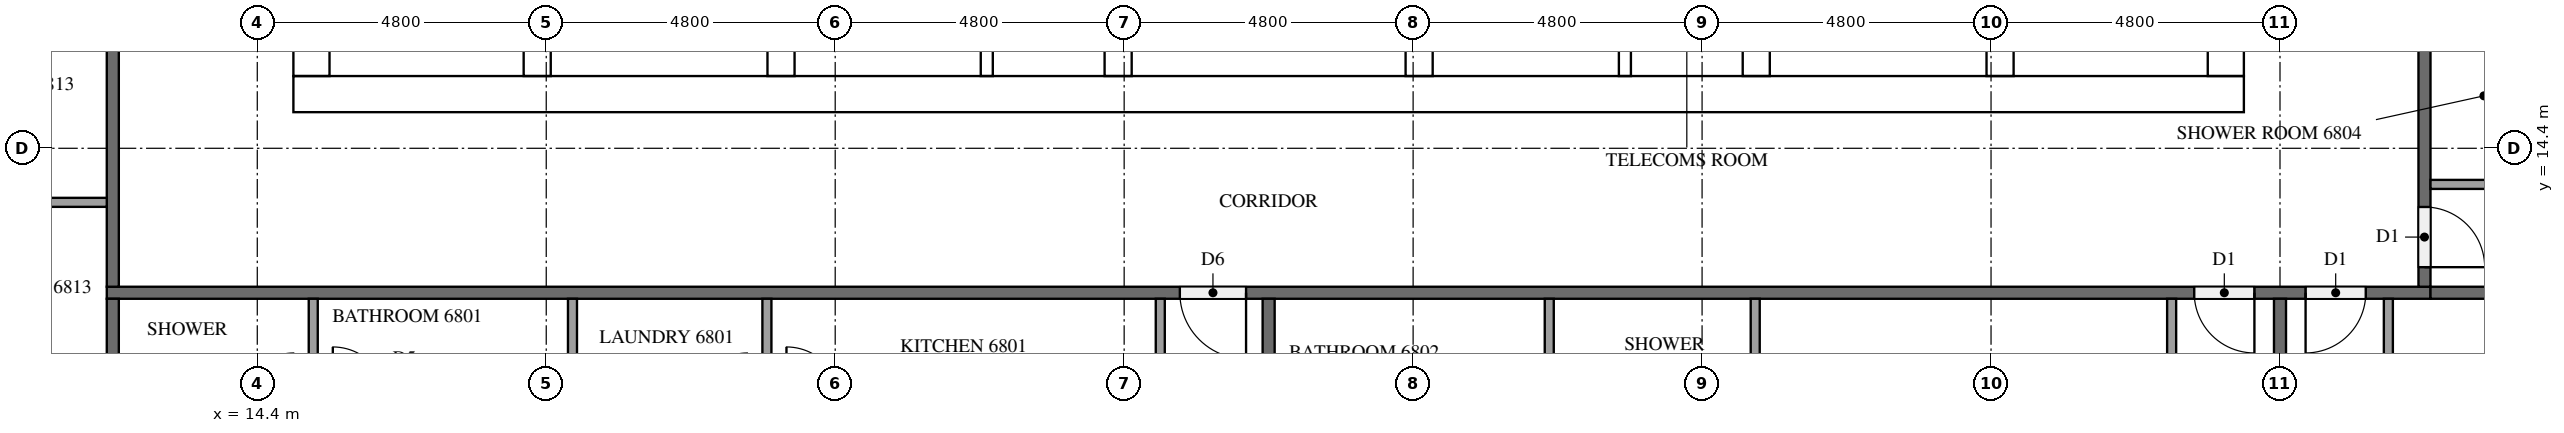
"""IFC4 building model, lengths in metres.
Left out: names, types, materials, properties, quantities, classifications, styles, units other than length and angle.
Written with IfcOpenShell. Run it as: python <this file> out.ifc"""

import sys

from ifc_helpers import new_model, si_unit, direction, frame, frame_2d, origin, place, context, subcontext, project, spatial, rectangle, extrude, element, fill, save


model = new_model("IFC4")
c1 = context("Model", 3, precision=1e-05, world=origin(), true_north=direction((0.0, 1.0)))
c2 = subcontext(c1, "Body", "Model", "MODEL_VIEW")
j1 = project(units=[si_unit("LENGTHUNIT", "METRE"), si_unit("PLANEANGLEUNIT", "RADIAN")], contexts=[c1])
p1 = place(None, origin())
s1 = spatial("IfcSite", under=j1, at=p1, CompositionType="ELEMENT")
p2 = place(p1, origin())
s2 = spatial("IfcBuilding", under=s1, at=p2, CompositionType="ELEMENT")
p3 = place(p2, frame((0.0, 0.0, 259.7)))
s3 = spatial("IfcBuildingStorey", under=s2, at=p3, CompositionType="ELEMENT", Elevation=259.7)
p4 = place(p3, frame((15.0, 15.3, 0.0), z_axis=(0.0, 0.0, 1.0), x_axis=(1.0, 0.0, 0.0)))
e1 = element("IfcWall", 1, at=p4, inside=s3, PredefinedType="SHEAR", context=c2, shape_type="SweptSolid", body=[
    extrude(rectangle(XDim=32.4, YDim=0.6, at=frame_2d((16.2, 0.0))), origin(), (0.0, 0.0, 1.0), 3.1),
])
p5 = place(p4, frame((15.3, 0.0, 0.0)))
e2 = element("IfcOpeningElement", 2, at=p5, cuts=e1, PredefinedType="OPENING", context=c2, shape_type="SweptSolid", body=[
    extrude(rectangle(XDim=1.8, YDim=2.1, at=frame_2d((0.9, 1.05))), frame((0.0, 0.31, 0.0), z_axis=(0.0, -1.0, 0.0), x_axis=(1.0, 0.0, 0.0)), (0.0, 0.0, 1.0), 0.62),
])
p6 = place(p3, frame((15.3, 15.6, 0.0), z_axis=(0.0, 0.0, 1.0), x_axis=(0.0, 1.0, 0.0)))
e3 = element("IfcWall", 3, at=p6, inside=s3, PredefinedType="SHEAR", context=c2, shape_type="SweptSolid", body=[
    extrude(rectangle(XDim=21.6, YDim=0.6, at=frame_2d((10.8, 0.0))), origin(), (0.0, 0.0, 1.0), 3.1),
])
p7 = place(p6, frame((5.16, 0.0, 0.0)))
e4 = element("IfcOpeningElement", 4, at=p7, cuts=e3, PredefinedType="OPENING", context=c2, shape_type="SweptSolid", body=[
    extrude(rectangle(XDim=1.2, YDim=2.1, at=frame_2d((0.6, 1.05))), frame((0.0, 0.31, 0.0), z_axis=(0.0, -1.0, 0.0), x_axis=(1.0, 0.0, 0.0)), (0.0, 0.0, 1.0), 0.62),
])
p8 = place(p3, frame((47.1, 15.6, 0.0), z_axis=(0.0, 0.0, 1.0), x_axis=(0.0, 1.0, 0.0)))
e5 = element("IfcWall", 5, at=p8, inside=s3, PredefinedType="SHEAR", context=c2, shape_type="SweptSolid", body=[
    extrude(rectangle(XDim=21.6, YDim=0.6, at=frame_2d((10.8, 0.0))), origin(), (0.0, 0.0, 1.0), 3.1),
])
p9 = place(p8, frame((10.5, 0.0, 0.0)))
e6 = element("IfcOpeningElement", 6, at=p9, cuts=e5, PredefinedType="OPENING", context=c2, shape_type="SweptSolid", body=[
    extrude(rectangle(XDim=1.2, YDim=2.1, at=frame_2d((0.6, 1.05))), frame((0.0, 0.31, 0.0), z_axis=(0.0, -1.0, 0.0), x_axis=(1.0, 0.0, 0.0)), (0.0, 0.0, 1.0), 0.62),
])
p10 = place(p3, frame((19.05, 15.6, 0.0), z_axis=(0.0, 0.0, 1.0), x_axis=(0.0, 1.0, 0.0)))
e7 = element("IfcWall", 7, at=p10, inside=s3, PredefinedType="SHEAR", context=c2, shape_type="SweptSolid", body=[
    extrude(rectangle(XDim=15.425, YDim=0.45, at=frame_2d((7.712, 0.0))), origin(), (0.0, 0.0, 1.0), 3.1),
])
p11 = place(p10, frame((9.85, 0.0, 0.0)))
e8 = element("IfcOpeningElement", 8, at=p11, cuts=e7, PredefinedType="OPENING", context=c2, shape_type="SweptSolid", body=[
    extrude(rectangle(XDim=1.1, YDim=2.1, at=frame_2d((0.55, 1.05))), frame((0.0, 0.235, 0.0), z_axis=(0.0, -1.0, 0.0), x_axis=(1.0, 0.0, 0.0)), (0.0, 0.0, 1.0), 0.47),
])
p12 = place(p10, frame((13.35, 0.0, 0.0)))
e9 = element("IfcOpeningElement", 9, at=p12, cuts=e7, PredefinedType="OPENING", context=c2, shape_type="SweptSolid", body=[
    extrude(rectangle(XDim=1.1, YDim=2.1, at=frame_2d((0.55, 1.05))), frame((0.0, 0.235, 0.0), z_axis=(0.0, -1.0, 0.0), x_axis=(1.0, 0.0, 0.0)), (0.0, 0.0, 1.0), 0.47),
])
p13 = place(p10, frame((0.6, 0.0, 0.0)))
e10 = element("IfcOpeningElement", 10, at=p13, cuts=e7, PredefinedType="OPENING", context=c2, shape_type="SweptSolid", body=[
    extrude(rectangle(XDim=1.2, YDim=2.1, at=frame_2d((0.6, 1.05))), frame((0.0, 0.235, 0.0), z_axis=(0.0, -1.0, 0.0), x_axis=(1.0, 0.0, 0.0)), (0.0, 0.0, 1.0), 0.47),
])
p14 = place(p3, frame((23.1, 15.6, 0.0), z_axis=(0.0, 0.0, 1.0), x_axis=(0.0, 1.0, 0.0)))
e11 = element("IfcWall", 11, at=p14, inside=s3, PredefinedType="SHEAR", context=c2, shape_type="SweptSolid", body=[
    extrude(rectangle(XDim=21.6, YDim=0.45, at=frame_2d((10.8, 0.0))), origin(), (0.0, 0.0, 1.0), 3.1),
])
p15 = place(p3, frame((39.3, 15.6, 0.0), z_axis=(0.0, 0.0, 1.0), x_axis=(0.0, 1.0, 0.0)))
e12 = element("IfcWall", 12, at=p15, inside=s3, PredefinedType="SHEAR", context=c2, shape_type="SweptSolid", body=[
    extrude(rectangle(XDim=8.65, YDim=0.45, at=frame_2d((4.325, 0.0))), origin(), (0.0, 0.0, 1.0), 3.1),
])
p16 = place(p3, frame((43.35, 15.6, 0.0), z_axis=(0.0, 0.0, 1.0), x_axis=(0.0, 1.0, 0.0)))
e13 = element("IfcWall", 13, at=p16, inside=s3, PredefinedType="SHEAR", context=c2, shape_type="SweptSolid", body=[
    extrude(rectangle(XDim=8.65, YDim=0.45, at=frame_2d((4.325, 0.0))), origin(), (0.0, 0.0, 1.0), 3.1),
])
p17 = place(p16, frame((0.6, 0.0, 0.0)))
e14 = element("IfcOpeningElement", 14, at=p17, cuts=e13, PredefinedType="OPENING", context=c2, shape_type="SweptSolid", body=[
    extrude(rectangle(XDim=1.2, YDim=2.1, at=frame_2d((0.6, 1.05))), frame((0.0, 0.235, 0.0), z_axis=(0.0, -1.0, 0.0), x_axis=(1.0, 0.0, 0.0)), (0.0, 0.0, 1.0), 0.47),
])
for number, where, z_axis, x_axis in (
    (15, (28.7, 15.6, 0.0), (0.0, 0.0, 1.0), (0.0, 1.0, 0.0)),
    (16, (33.7, 15.6, 0.0), (0.0, 0.0, 1.0), (0.0, 1.0, 0.0)),
):
    element("IfcWall", number, at=place(p3, frame(where, z_axis=z_axis, x_axis=x_axis)), inside=s3, PredefinedType="SHEAR", context=c2, shape_type="SweptSolid", body=[
        extrude(rectangle(XDim=2.925, YDim=0.45, at=frame_2d((1.462, 0.0))), origin(), (0.0, 0.0, 1.0), 3.1),
    ])
for number, where, z_axis, x_axis in (
    (17, (26.518, 15.6, 0.0), (0.0, 0.0, 1.0), (0.0, 1.0, 0.0)),
    (18, (37.118, 15.6, 0.0), (0.0, 0.0, 1.0), (0.0, 1.0, 0.0)),
):
    element("IfcWall", number, at=place(p3, frame(where, z_axis=z_axis, x_axis=x_axis)), inside=s3, PredefinedType="PARTITIONING", context=c2, shape_type="SweptSolid", body=[
        extrude(rectangle(XDim=2.925, YDim=0.2, at=frame_2d((1.462, 0.0))), origin(), (0.0, 0.0, 1.0), 3.1),
    ])
p18 = place(p3, frame((50.5, 12.0, 0.0), z_axis=(0.0, 0.0, 1.0), x_axis=(-1.0, 0.0, 0.0)))
e19 = element("IfcWall", 19, at=p18, inside=s3, PredefinedType="PARTITIONING", context=c2, shape_type="SweptSolid", body=[
    extrude(rectangle(XDim=38.6, YDim=0.2, at=frame_2d((19.3, 0.0))), origin(), (0.0, 0.0, 1.0), 3.1),
])
p19 = place(p18, frame((19.675, 0.0, 0.0)))
e20 = element("IfcOpeningElement", 20, at=p19, cuts=e19, PredefinedType="OPENING", context=c2, shape_type="SweptSolid", body=[
    extrude(rectangle(XDim=1.1, YDim=2.1, at=frame_2d((0.55, 1.05))), frame((0.0, 0.11, 0.0), z_axis=(0.0, -1.0, 0.0), x_axis=(1.0, 0.0, 0.0)), (0.0, 0.0, 1.0), 0.22),
])
p20 = place(p18, frame((2.925, 0.0, 0.0)))
e21 = element("IfcOpeningElement", 21, at=p20, cuts=e19, PredefinedType="OPENING", context=c2, shape_type="SweptSolid", body=[
    extrude(rectangle(XDim=1.0, YDim=2.1, at=frame_2d((0.5, 1.05))), frame((0.0, 0.11, 0.0), z_axis=(0.0, -1.0, 0.0), x_axis=(1.0, 0.0, 0.0)), (0.0, 0.0, 1.0), 0.22),
])
p21 = place(p18, frame((1.075, 0.0, 0.0)))
e22 = element("IfcOpeningElement", 22, at=p21, cuts=e19, PredefinedType="OPENING", context=c2, shape_type="SweptSolid", body=[
    extrude(rectangle(XDim=1.0, YDim=2.1, at=frame_2d((0.5, 1.05))), frame((0.0, 0.11, 0.0), z_axis=(0.0, -1.0, 0.0), x_axis=(1.0, 0.0, 0.0)), (0.0, 0.0, 1.0), 0.22),
])
p22 = place(p3, frame((50.4, 40.7, 0.0), z_axis=(0.0, 0.0, 1.0), x_axis=(0.0, -1.0, 0.0)))
e23 = element("IfcWall", 23, at=p22, inside=s3, PredefinedType="PARTITIONING", context=c2, shape_type="SweptSolid", body=[
    extrude(rectangle(XDim=28.6, YDim=0.2, at=frame_2d((14.3, 0.0))), origin(), (0.0, 0.0, 1.0), 3.1),
])
p23 = place(p22, frame((27.275, 0.0, 0.0)))
e24 = element("IfcOpeningElement", 24, at=p23, cuts=e23, PredefinedType="OPENING", context=c2, shape_type="SweptSolid", body=[
    extrude(rectangle(XDim=1.0, YDim=2.1, at=frame_2d((0.5, 1.05))), frame((0.0, 0.11, 0.0), z_axis=(0.0, -1.0, 0.0), x_axis=(1.0, 0.0, 0.0)), (0.0, 0.0, 1.0), 0.22),
])
p24 = place(p22, frame((7.525, 0.0, 0.0)))
e25 = element("IfcOpeningElement", 25, at=p24, cuts=e23, PredefinedType="OPENING", context=c2, shape_type="SweptSolid", body=[
    extrude(rectangle(XDim=1.0, YDim=2.1, at=frame_2d((0.5, 1.05))), frame((0.0, 0.11, 0.0), z_axis=(0.0, -1.0, 0.0), x_axis=(1.0, 0.0, 0.0)), (0.0, 0.0, 1.0), 0.22),
])
p25 = place(p22, frame((5.675, 0.0, 0.0)))
e26 = element("IfcOpeningElement", 26, at=p25, cuts=e23, PredefinedType="OPENING", context=c2, shape_type="SweptSolid", body=[
    extrude(rectangle(XDim=1.0, YDim=2.1, at=frame_2d((0.5, 1.05))), frame((0.0, 0.11, 0.0), z_axis=(0.0, -1.0, 0.0), x_axis=(1.0, 0.0, 0.0)), (0.0, 0.0, 1.0), 0.22),
])
p26 = place(p3, frame((12.0, 12.1, 0.0), z_axis=(0.0, 0.0, 1.0), x_axis=(0.0, 1.0, 0.0)))
e27 = element("IfcWall", 27, at=p26, inside=s3, PredefinedType="PARTITIONING", context=c2, shape_type="SweptSolid", body=[
    extrude(rectangle(XDim=28.6, YDim=0.2, at=frame_2d((14.3, 0.0))), origin(), (0.0, 0.0, 1.0), 3.1),
])
p27 = place(p26, frame((21.875, 0.0, 0.0)))
e28 = element("IfcOpeningElement", 28, at=p27, cuts=e27, PredefinedType="OPENING", context=c2, shape_type="SweptSolid", body=[
    extrude(rectangle(XDim=1.1, YDim=2.1, at=frame_2d((0.55, 1.05))), frame((0.0, 0.11, 0.0), z_axis=(0.0, -1.0, 0.0), x_axis=(1.0, 0.0, 0.0)), (0.0, 0.0, 1.0), 0.22),
])
p28 = place(p26, frame((20.075, 0.0, 0.0)))
e29 = element("IfcOpeningElement", 29, at=p28, cuts=e27, PredefinedType="OPENING", context=c2, shape_type="SweptSolid", body=[
    extrude(rectangle(XDim=1.0, YDim=2.1, at=frame_2d((0.5, 1.05))), frame((0.0, 0.11, 0.0), z_axis=(0.0, -1.0, 0.0), x_axis=(1.0, 0.0, 0.0)), (0.0, 0.0, 1.0), 0.22),
])
p29 = place(p26, frame((5.675, 0.0, 0.0)))
e30 = element("IfcOpeningElement", 30, at=p29, cuts=e27, PredefinedType="OPENING", context=c2, shape_type="SweptSolid", body=[
    extrude(rectangle(XDim=1.0, YDim=2.1, at=frame_2d((0.5, 1.05))), frame((0.0, 0.11, 0.0), z_axis=(0.0, -1.0, 0.0), x_axis=(1.0, 0.0, 0.0)), (0.0, 0.0, 1.0), 0.22),
])
for number, where, z_axis, x_axis in (
    (31, (31.2, 11.9, 0.0), (0.0, 0.0, 1.0), (0.0, -1.0, 0.0)),
    (32, (12.0, 4.9, 0.0), (0.0, 0.0, 1.0), (0.0, 1.0, 0.0)),
    (33, (48.0, 11.9, 0.0), (0.0, 0.0, 1.0), (0.0, -1.0, 0.0)),
    (34, (50.5, 12.0, 0.0), (0.0, 0.0, 1.0), (1.0, 0.0, 0.0)),
):
    element("IfcWall", number, at=place(p3, frame(where, z_axis=z_axis, x_axis=x_axis)), inside=s3, PredefinedType="PARTITIONING", context=c2, shape_type="SweptSolid", body=[
        extrude(rectangle(XDim=7.0, YDim=0.2, at=frame_2d((3.5, 0.0))), origin(), (0.0, 0.0, 1.0), 3.1),
    ])
for number, where, z_axis, x_axis in (
    (35, (22.865, 11.9, 0.0), (0.0, 0.0, 1.0), (0.0, -1.0, 0.0)),
    (36, (19.636, 11.9, 0.0), (0.0, 0.0, 1.0), (0.0, -1.0, 0.0)),
    (37, (15.33, 11.9, 0.0), (0.0, 0.0, 1.0), (0.0, -1.0, 0.0)),
):
    element("IfcWall", number, at=place(p3, frame(where, z_axis=z_axis, x_axis=x_axis)), inside=s3, PredefinedType="PARTITIONING", context=c2, shape_type="SweptSolid", body=[
        extrude(rectangle(XDim=1.625, YDim=0.15, at=frame_2d((0.812, 0.0))), origin(), (0.0, 0.0, 1.0), 3.1),
    ])
p30 = place(p3, frame((29.4, 11.9, 0.0), z_axis=(0.0, 0.0, 1.0), x_axis=(0.0, -1.0, 0.0)))
e38 = element("IfcWall", 38, at=p30, inside=s3, PredefinedType="PARTITIONING", context=c2, shape_type="SweptSolid", body=[
    extrude(rectangle(XDim=1.775, YDim=0.15, at=frame_2d((0.887, 0.0))), origin(), (0.0, 0.0, 1.0), 3.1),
])
for number, where, z_axis, x_axis in (
    (39, (39.283, 11.9, 0.0), (0.0, 0.0, 1.0), (0.0, -1.0, 0.0)),
    (40, (35.862, 11.9, 0.0), (0.0, 0.0, 1.0), (0.0, -1.0, 0.0)),
):
    element("IfcWall", number, at=place(p3, frame(where, z_axis=z_axis, x_axis=x_axis)), inside=s3, PredefinedType="PARTITIONING", context=c2, shape_type="SweptSolid", body=[
        extrude(rectangle(XDim=2.225, YDim=0.15, at=frame_2d((1.112, 0.0))), origin(), (0.0, 0.0, 1.0), 3.1),
    ])
p31 = place(p3, frame((46.2, 11.9, 0.0), z_axis=(0.0, 0.0, 1.0), x_axis=(0.0, -1.0, 0.0)))
e41 = element("IfcWall", 41, at=p31, inside=s3, PredefinedType="PARTITIONING", context=c2, shape_type="SweptSolid", body=[
    extrude(rectangle(XDim=2.375, YDim=0.15, at=frame_2d((1.188, 0.0))), origin(), (0.0, 0.0, 1.0), 3.1),
])
p32 = place(p3, frame((49.8, 11.9, 0.0), z_axis=(0.0, 0.0, 1.0), x_axis=(0.0, -1.0, 0.0)))
e42 = element("IfcWall", 42, at=p32, inside=s3, PredefinedType="PARTITIONING", context=c2, shape_type="SweptSolid", body=[
    extrude(rectangle(XDim=2.225, YDim=0.15, at=frame_2d((1.112, 0.0))), origin(), (0.0, 0.0, 1.0), 3.1),
])
p33 = place(p3, frame((50.5, 13.8, 0.0), z_axis=(0.0, 0.0, 1.0), x_axis=(1.0, 0.0, 0.0)))
e43 = element("IfcWall", 43, at=p33, inside=s3, PredefinedType="PARTITIONING", context=c2, shape_type="SweptSolid", body=[
    extrude(rectangle(XDim=1.925, YDim=0.15, at=frame_2d((0.962, 0.0))), origin(), (0.0, 0.0, 1.0), 3.1),
])
p34 = place(p3, frame((11.9, 13.502, 0.0), z_axis=(0.0, 0.0, 1.0), x_axis=(-1.0, 0.0, 0.0)))
e44 = element("IfcWall", 44, at=p34, inside=s3, PredefinedType="PARTITIONING", context=c2, shape_type="SweptSolid", body=[
    extrude(rectangle(XDim=3.575, YDim=0.15, at=frame_2d((1.788, 0.0))), origin(), (0.0, 0.0, 1.0), 3.1),
])
p35 = place(p5, frame((1.8, 0.0, 0.0), z_axis=(0.0, 0.0, 1.0), x_axis=(-1.0, 0.0, 0.0)))
e45 = element("IfcDoor", 45, at=p35, inside=s3, OperationType="DOUBLE_DOOR_SINGLE_SWING", PredefinedType="DOOR", context=c2, shape_type="SweptSolid", body=[
    extrude(rectangle(XDim=1.8, YDim=2.1, at=frame_2d((0.9, 1.05))), frame((0.0, 0.025, 0.0), z_axis=(0.0, -1.0, 0.0), x_axis=(1.0, 0.0, 0.0)), (0.0, 0.0, 1.0), 0.05),
])
fill(e2, e45)
p36 = place(p19, origin())
e46 = element("IfcDoor", 46, at=p36, inside=s3, OperationType="SINGLE_SWING_LEFT", PredefinedType="DOOR", context=c2, shape_type="SweptSolid", body=[
    extrude(rectangle(XDim=1.1, YDim=2.1, at=frame_2d((0.55, 1.05))), frame((0.0, 0.025, 0.0), z_axis=(0.0, -1.0, 0.0), x_axis=(1.0, 0.0, 0.0)), (0.0, 0.0, 1.0), 0.05),
])
fill(e20, e46)
p37 = place(p20, origin())
e47 = element("IfcDoor", 47, at=p37, inside=s3, OperationType="SINGLE_SWING_LEFT", PredefinedType="DOOR", context=c2, shape_type="SweptSolid", body=[
    extrude(rectangle(XDim=1.0, YDim=2.1, at=frame_2d((0.5, 1.05))), frame((0.0, 0.025, 0.0), z_axis=(0.0, -1.0, 0.0), x_axis=(1.0, 0.0, 0.0)), (0.0, 0.0, 1.0), 0.05),
])
fill(e21, e47)
p38 = place(p21, origin())
e48 = element("IfcDoor", 48, at=p38, inside=s3, OperationType="SINGLE_SWING_RIGHT", PredefinedType="DOOR", context=c2, shape_type="SweptSolid", body=[
    extrude(rectangle(XDim=1.0, YDim=2.1, at=frame_2d((0.5, 1.05))), frame((0.0, 0.025, 0.0), z_axis=(0.0, -1.0, 0.0), x_axis=(1.0, 0.0, 0.0)), (0.0, 0.0, 1.0), 0.05),
])
fill(e22, e48)
p39 = place(p23, origin())
e49 = element("IfcDoor", 49, at=p39, inside=s3, OperationType="SINGLE_SWING_RIGHT", PredefinedType="DOOR", context=c2, shape_type="SweptSolid", body=[
    extrude(rectangle(XDim=1.0, YDim=2.1, at=frame_2d((0.5, 1.05))), frame((0.0, 0.025, 0.0), z_axis=(0.0, -1.0, 0.0), x_axis=(1.0, 0.0, 0.0)), (0.0, 0.0, 1.0), 0.05),
])
fill(e24, e49)
save(model, sys.argv[1])
